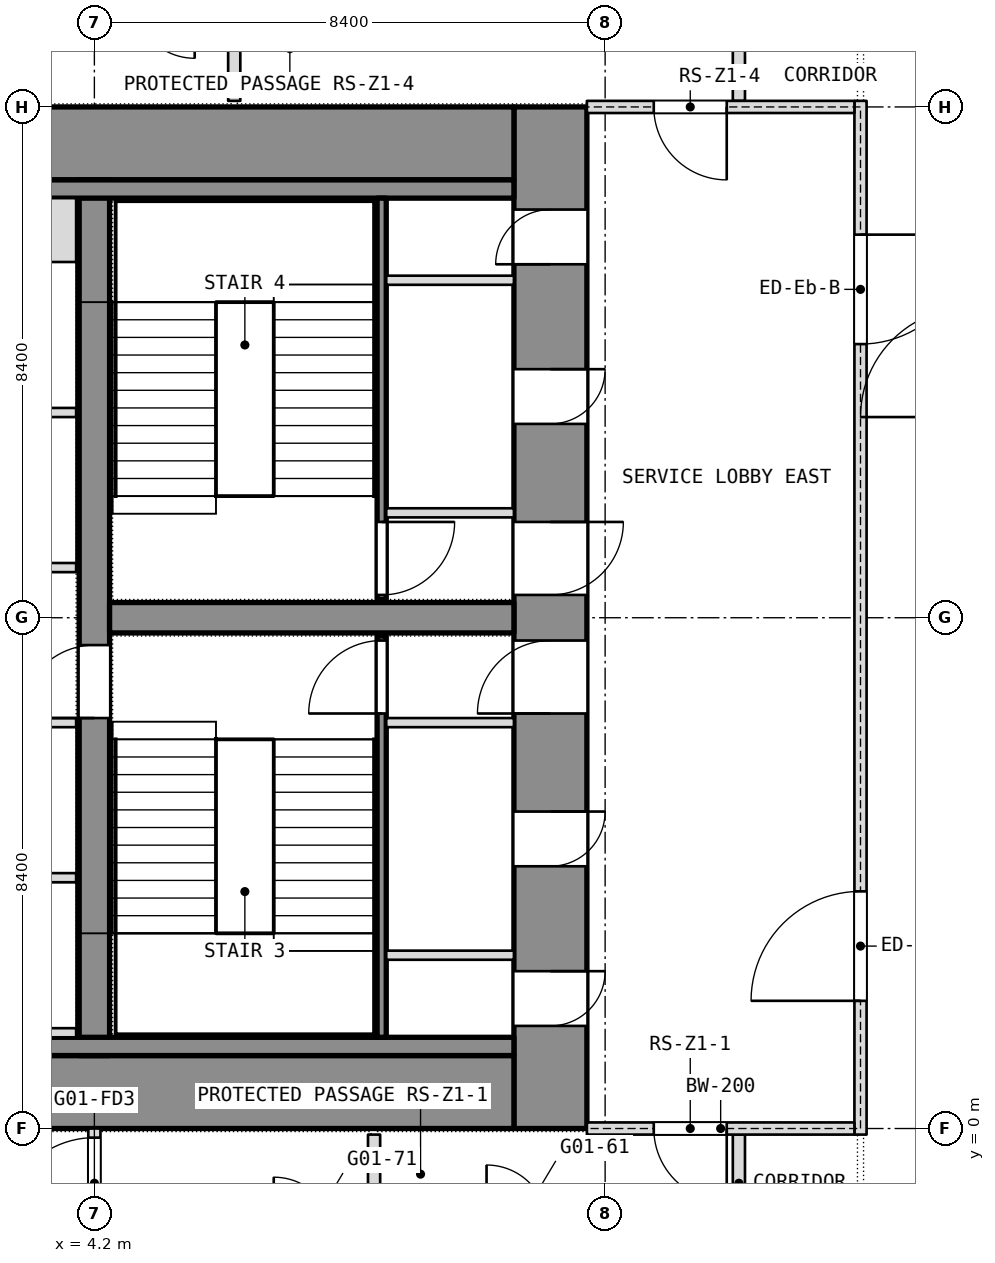
"""IFC4 building model, lengths in metres.
Left out: names, types, materials, properties, quantities, classifications, styles, units other than length and angle.
Written with IfcOpenShell. Run it as: python <this file> out.ifc"""

import sys

from ifc_helpers import new_model, si_unit, direction, frame, frame_2d, origin, place, context, subcontext, project, spatial, rectangle, extrude, element, fill, save


model = new_model("IFC4")
c1 = context("Model", 3, precision=1e-05, world=origin(), true_north=direction((0.0, 1.0)))
c2 = subcontext(c1, "Body", "Model", "MODEL_VIEW")
j1 = project(units=[si_unit("LENGTHUNIT", "METRE"), si_unit("PLANEANGLEUNIT", "RADIAN")], contexts=[c1])
p1 = place(None, origin())
s1 = spatial("IfcSite", under=j1, at=p1, CompositionType="ELEMENT")
p2 = place(p1, origin())
s2 = spatial("IfcBuilding", under=s1, at=p2, CompositionType="ELEMENT")
p3 = place(p2, frame((0.0, 0.0, 36.5)))
s3 = spatial("IfcBuildingStorey", under=s2, at=p3, CompositionType="ELEMENT", Elevation=36.5)
p4 = place(p3, frame((11.7, 0.0, 0.0), z_axis=(0.0, 0.0, 1.0), x_axis=(0.0, 1.0, 0.0)))
e1 = element("IfcWall", 1, at=p4, inside=s3, PredefinedType="SHEAR", context=c2, shape_type="SweptSolid", body=[
    extrude(rectangle(XDim=16.8, YDim=1.2, at=frame_2d((8.4, 0.0))), origin(), (0.0, 0.0, 1.0), 3.6),
])
p5 = place(p4, frame((1.688, 0.0, 0.0)))
e2 = element("IfcOpeningElement", 2, at=p5, cuts=e1, PredefinedType="OPENING", context=c2, shape_type="SweptSolid", body=[
    extrude(rectangle(XDim=0.9, YDim=2.1, at=frame_2d((0.45, 1.05))), frame((0.0, 0.6, 0.0), z_axis=(0.0, -1.0, 0.0), x_axis=(1.0, 0.0, 0.0)), (0.0, 0.0, 1.0), 1.2),
])
p6 = place(p4, frame((4.312, 0.0, 0.0)))
e3 = element("IfcOpeningElement", 3, at=p6, cuts=e1, PredefinedType="OPENING", context=c2, shape_type="SweptSolid", body=[
    extrude(rectangle(XDim=0.9, YDim=2.1, at=frame_2d((0.45, 1.05))), frame((0.0, 0.6, 0.0), z_axis=(0.0, -1.0, 0.0), x_axis=(1.0, 0.0, 0.0)), (0.0, 0.0, 1.0), 1.2),
])
p7 = place(p4, frame((6.825, 0.0, 0.0)))
e4 = element("IfcOpeningElement", 4, at=p7, cuts=e1, PredefinedType="OPENING", context=c2, shape_type="SweptSolid", body=[
    extrude(rectangle(XDim=1.2, YDim=2.1, at=frame_2d((0.6, 1.05))), frame((0.0, 0.6, 0.0), z_axis=(0.0, -1.0, 0.0), x_axis=(1.0, 0.0, 0.0)), (0.0, 0.0, 1.0), 1.2),
])
p8 = place(p4, frame((14.212, 0.0, 0.0)))
e5 = element("IfcOpeningElement", 5, at=p8, cuts=e1, PredefinedType="OPENING", context=c2, shape_type="SweptSolid", body=[
    extrude(rectangle(XDim=0.9, YDim=2.1, at=frame_2d((0.45, 1.05))), frame((0.0, 0.6, 0.0), z_axis=(0.0, -1.0, 0.0), x_axis=(1.0, 0.0, 0.0)), (0.0, 0.0, 1.0), 1.2),
])
p9 = place(p4, frame((11.587, 0.0, 0.0)))
e6 = element("IfcOpeningElement", 6, at=p9, cuts=e1, PredefinedType="OPENING", context=c2, shape_type="SweptSolid", body=[
    extrude(rectangle(XDim=0.9, YDim=2.1, at=frame_2d((0.45, 1.05))), frame((0.0, 0.6, 0.0), z_axis=(0.0, -1.0, 0.0), x_axis=(1.0, 0.0, 0.0)), (0.0, 0.0, 1.0), 1.2),
])
p10 = place(p4, frame((8.775, 0.0, 0.0)))
e7 = element("IfcOpeningElement", 7, at=p10, cuts=e1, PredefinedType="OPENING", context=c2, shape_type="SweptSolid", body=[
    extrude(rectangle(XDim=1.2, YDim=2.1, at=frame_2d((0.6, 1.05))), frame((0.0, 0.6, 0.0), z_axis=(0.0, -1.0, 0.0), x_axis=(1.0, 0.0, 0.0)), (0.0, 0.0, 1.0), 1.2),
])
for number, where, z_axis, x_axis in (
    (8, (-11.1, 0.6, 0.0), (0.0, 0.0, 1.0), (1.0, 0.0, 0.0)),
    (9, (-11.1, 16.2, 0.0), (0.0, 0.0, 1.0), (1.0, 0.0, 0.0)),
):
    element("IfcWall", number, at=place(p3, frame(where, z_axis=z_axis, x_axis=x_axis)), inside=s3, PredefinedType="SHEAR", context=c2, shape_type="SweptSolid", body=[
        extrude(rectangle(XDim=22.2, YDim=1.2, at=frame_2d((11.1, 0.0))), origin(), (0.0, 0.0, 1.0), 3.6),
    ])
p11 = place(p3, frame((4.2, 1.2, 0.0), z_axis=(0.0, 0.0, 1.0), x_axis=(0.0, 1.0, 0.0)))
e10 = element("IfcWall", 10, at=p11, inside=s3, PredefinedType="SHEAR", context=c2, shape_type="SweptSolid", body=[
    extrude(rectangle(XDim=14.4, YDim=0.5, at=frame_2d((7.2, 0.0))), origin(), (0.0, 0.0, 1.0), 3.6),
])
p12 = place(p11, frame((5.55, 0.0, 0.0)))
e11 = element("IfcOpeningElement", 11, at=p12, cuts=e10, PredefinedType="OPENING", context=c2, shape_type="SweptSolid", body=[
    extrude(rectangle(XDim=1.2, YDim=2.1, at=frame_2d((0.6, 1.05))), frame((0.0, 0.25, 0.0), z_axis=(0.0, -1.0, 0.0), x_axis=(1.0, 0.0, 0.0)), (0.0, 0.0, 1.0), 0.5),
])
p13 = place(p3, frame((4.45, 8.4, 0.0), z_axis=(0.0, 0.0, 1.0), x_axis=(1.0, 0.0, 0.0)))
e12 = element("IfcWall", 12, at=p13, inside=s3, PredefinedType="SHEAR", context=c2, shape_type="SweptSolid", body=[
    extrude(rectangle(XDim=6.65, YDim=0.5, at=frame_2d((3.325, 0.0))), origin(), (0.0, 0.0, 1.0), 3.6),
])
p14 = place(p3, frame((14.8, -1.7, 0.0), z_axis=(0.0, 0.0, 1.0), x_axis=(0.0, 1.0, 0.0)))
e13 = element("IfcWall", 13, at=p14, inside=s3, PredefinedType="PARTITIONING", context=c2, shape_type="SweptSolid", body=[
    extrude(rectangle(XDim=1.6, YDim=0.2, at=frame_2d((0.8, 0.0))), origin(), (0.0, 0.0, 1.0), 3.34),
])
p15 = place(p3, frame((14.8, 16.9, 0.0), z_axis=(0.0, 0.0, 1.0), x_axis=(0.0, 1.0, 0.0)))
e14 = element("IfcWall", 14, at=p15, inside=s3, PredefinedType="PARTITIONING", context=c2, shape_type="SweptSolid", body=[
    extrude(rectangle(XDim=1.6, YDim=0.2, at=frame_2d((0.8, 0.0))), origin(), (0.0, 0.0, 1.0), 3.34),
])
p16 = place(p3, frame((8.8, -1.7, 0.0), z_axis=(0.0, 0.0, 1.0), x_axis=(0.0, 1.0, 0.0)))
e15 = element("IfcWall", 15, at=p16, inside=s3, PredefinedType="PARTITIONING", context=c2, shape_type="SweptSolid", body=[
    extrude(rectangle(XDim=1.6, YDim=0.2, at=frame_2d((0.8, 0.0))), origin(), (0.0, 0.0, 1.0), 3.34),
])
p17 = place(p3, frame((6.5, 16.9, 0.0), z_axis=(0.0, 0.0, 1.0), x_axis=(0.0, 1.0, 0.0)))
e16 = element("IfcWall", 16, at=p17, inside=s3, PredefinedType="PARTITIONING", context=c2, shape_type="SweptSolid", body=[
    extrude(rectangle(XDim=1.6, YDim=0.2, at=frame_2d((0.8, 0.0))), origin(), (0.0, 0.0, 1.0), 3.34),
])
p18 = place(p3, frame((4.2, -12.7, 0.0), z_axis=(0.0, 0.0, 1.0), x_axis=(0.0, 1.0, 0.0)))
e17 = element("IfcWall", 17, at=p18, inside=s3, PredefinedType="PARTITIONING", context=c2, shape_type="SweptSolid", body=[
    extrude(rectangle(XDim=12.7, YDim=0.2, at=frame_2d((6.35, 0.0))), origin(), (0.0, 0.0, 1.0), 3.34),
])
p19 = place(p18, frame((11.05, 0.0, 0.0)))
e18 = element("IfcOpeningElement", 18, at=p19, cuts=e17, PredefinedType="OPENING", context=c2, shape_type="SweptSolid", body=[
    extrude(rectangle(XDim=1.5, YDim=2.1, at=frame_2d((0.75, 1.05))), frame((0.0, 0.1, 0.0), z_axis=(0.0, -1.0, 0.0), x_axis=(1.0, 0.0, 0.0)), (0.0, 0.0, 1.0), 0.2),
])
p20 = place(p18, frame((0.225, 0.0, 0.0)))
e19 = element("IfcOpeningElement", 19, at=p20, cuts=e17, PredefinedType="OPENING", context=c2, shape_type="SweptSolid", body=[
    extrude(rectangle(XDim=1.5, YDim=2.1, at=frame_2d((0.75, 1.05))), frame((0.0, 0.1, 0.0), z_axis=(0.0, -1.0, 0.0), x_axis=(1.0, 0.0, 0.0)), (0.0, 0.0, 1.0), 0.2),
])
for number, where, z_axis, x_axis in (
    (20, (-11.1, 1.35, 0.0), (0.0, 0.0, 1.0), (1.0, 0.0, 0.0)),
    (21, (-11.1, 15.45, 0.0), (0.0, 0.0, 1.0), (1.0, 0.0, 0.0)),
):
    element("IfcWall", number, at=place(p3, frame(where, z_axis=z_axis, x_axis=x_axis)), inside=s3, PredefinedType="PARTITIONING", context=c2, shape_type="SweptSolid", body=[
        extrude(rectangle(XDim=22.2, YDim=0.3, at=frame_2d((11.1, 0.0))), origin(), (0.0, 0.0, 1.0), 3.34),
    ])
p21 = place(p3, frame((8.925, 1.5, 0.0), z_axis=(0.0, 0.0, 1.0), x_axis=(0.0, 1.0, 0.0)))
e22 = element("IfcWall", 22, at=p21, inside=s3, PredefinedType="SHEAR", context=c2, shape_type="SweptSolid", body=[
    extrude(rectangle(XDim=6.6, YDim=0.15, at=frame_2d((3.3, 0.0))), origin(), (0.0, 0.0, 1.0), 3.34),
])
p22 = place(p21, frame((5.325, 0.0, 0.0)))
e23 = element("IfcOpeningElement", 23, at=p22, cuts=e22, PredefinedType="OPENING", context=c2, shape_type="SweptSolid", body=[
    extrude(rectangle(XDim=1.2, YDim=2.1, at=frame_2d((0.6, 1.05))), frame((0.0, 0.075, 0.0), z_axis=(0.0, -1.0, 0.0), x_axis=(1.0, 0.0, 0.0)), (0.0, 0.0, 1.0), 0.15),
])
for number, where, z_axis, x_axis in (
    (24, (9.0, 6.675, 0.0), (0.0, 0.0, 1.0), (1.0, 0.0, 0.0)),
    (25, (9.0, 2.85, 0.0), (0.0, 0.0, 1.0), (1.0, 0.0, 0.0)),
):
    element("IfcWall", number, at=place(p3, frame(where, z_axis=z_axis, x_axis=x_axis)), inside=s3, PredefinedType="PARTITIONING", context=c2, shape_type="SweptSolid", body=[
        extrude(rectangle(XDim=2.1, YDim=0.15, at=frame_2d((1.05, 0.0))), origin(), (0.0, 0.0, 1.0), 3.34),
    ])
p23 = place(p3, frame((8.925, 8.7, 0.0), z_axis=(0.0, 0.0, 1.0), x_axis=(0.0, 1.0, 0.0)))
e26 = element("IfcWall", 26, at=p23, inside=s3, PredefinedType="SHEAR", context=c2, shape_type="SweptSolid", body=[
    extrude(rectangle(XDim=6.6, YDim=0.15, at=frame_2d((3.3, 0.0))), origin(), (0.0, 0.0, 1.0), 3.34),
])
p24 = place(p23, frame((0.075, 0.0, 0.0)))
e27 = element("IfcOpeningElement", 27, at=p24, cuts=e26, PredefinedType="OPENING", context=c2, shape_type="SweptSolid", body=[
    extrude(rectangle(XDim=1.2, YDim=2.1, at=frame_2d((0.6, 1.05))), frame((0.0, 0.075, 0.0), z_axis=(0.0, -1.0, 0.0), x_axis=(1.0, 0.0, 0.0)), (0.0, 0.0, 1.0), 0.15),
])
for number, where, z_axis, x_axis in (
    (28, (9.0, 10.125, 0.0), (0.0, 0.0, 1.0), (1.0, 0.0, 0.0)),
    (29, (9.0, 13.95, 0.0), (0.0, 0.0, 1.0), (1.0, 0.0, 0.0)),
):
    element("IfcWall", number, at=place(p3, frame(where, z_axis=z_axis, x_axis=x_axis)), inside=s3, PredefinedType="PARTITIONING", context=c2, shape_type="SweptSolid", body=[
        extrude(rectangle(XDim=2.1, YDim=0.15, at=frame_2d((1.05, 0.0))), origin(), (0.0, 0.0, 1.0), 3.34),
    ])
p25 = place(p3, frame((-3.9, 4.125, 0.0), z_axis=(0.0, 0.0, 1.0), x_axis=(1.0, 0.0, 0.0)))
e30 = element("IfcWall", 30, at=p25, inside=s3, PredefinedType="PARTITIONING", context=c2, shape_type="SweptSolid", body=[
    extrude(rectangle(XDim=7.8, YDim=0.15, at=frame_2d((3.9, 0.0))), origin(), (0.0, 0.0, 1.0), 3.34),
])
p26 = place(p25, frame((3.75, 0.0, 0.0)))
e31 = element("IfcOpeningElement", 31, at=p26, cuts=e30, PredefinedType="OPENING", context=c2, shape_type="SweptSolid", body=[
    extrude(rectangle(XDim=1.2, YDim=2.1, at=frame_2d((0.6, 1.05))), frame((0.0, 0.075, 0.0), z_axis=(0.0, -1.0, 0.0), x_axis=(1.0, 0.0, 0.0)), (0.0, 0.0, 1.0), 0.15),
])
p27 = place(p3, frame((-3.9, 11.775, 0.0), z_axis=(0.0, 0.0, 1.0), x_axis=(1.0, 0.0, 0.0)))
e32 = element("IfcWall", 32, at=p27, inside=s3, PredefinedType="PARTITIONING", context=c2, shape_type="SweptSolid", body=[
    extrude(rectangle(XDim=7.8, YDim=0.15, at=frame_2d((3.9, 0.0))), origin(), (0.0, 0.0, 1.0), 3.34),
])
p28 = place(p27, frame((3.3, 0.0, 0.0)))
e33 = element("IfcOpeningElement", 33, at=p28, cuts=e32, PredefinedType="OPENING", context=c2, shape_type="SweptSolid", body=[
    extrude(rectangle(XDim=1.2, YDim=2.1, at=frame_2d((0.6, 1.05))), frame((0.0, 0.075, 0.0), z_axis=(0.0, -1.0, 0.0), x_axis=(1.0, 0.0, 0.0)), (0.0, 0.0, 1.0), 0.15),
])
p29 = place(p3, frame((1.65, 1.575, 0.0), z_axis=(0.0, 0.0, 1.0), x_axis=(1.0, 0.0, 0.0)))
e34 = element("IfcWall", 34, at=p29, inside=s3, PredefinedType="SHEAR", context=c2, shape_type="SweptSolid", body=[
    extrude(rectangle(XDim=2.25, YDim=0.15, at=frame_2d((1.125, 0.0))), origin(), (0.0, 0.0, 1.0), 3.6),
])
p30 = place(p3, frame((1.65, 14.775, 0.0), z_axis=(0.0, 0.0, 1.0), x_axis=(1.0, 0.0, 0.0)))
e35 = element("IfcWall", 35, at=p30, inside=s3, PredefinedType="SHEAR", context=c2, shape_type="SweptSolid", body=[
    extrude(rectangle(XDim=2.25, YDim=1.05, at=frame_2d((1.125, 0.0))), origin(), (0.0, 0.0, 1.0), 3.6),
])
for number, where, z_axis, x_axis in (
    (36, (1.65, 6.675, 0.0), (0.0, 0.0, 1.0), (1.0, 0.0, 0.0)),
    (37, (1.65, 9.225, 0.0), (0.0, 0.0, 1.0), (1.0, 0.0, 0.0)),
):
    element("IfcWall", number, at=place(p3, frame(where, z_axis=z_axis, x_axis=x_axis)), inside=s3, PredefinedType="SHEAR", context=c2, shape_type="SweptSolid", body=[
        extrude(rectangle(XDim=2.25, YDim=0.15, at=frame_2d((1.125, 0.0))), origin(), (0.0, 0.0, 1.0), 3.6),
    ])
p31 = place(p3, frame((16.8, -0.1, 0.0), z_axis=(0.0, 0.0, 1.0), x_axis=(0.0, 1.0, 0.0)))
e38 = element("IfcWall", 38, at=p31, inside=s3, PredefinedType="PARTITIONING", context=c2, shape_type="SweptSolid", body=[
    extrude(rectangle(XDim=17.0, YDim=0.2, at=frame_2d((8.5, 0.0))), origin(), (0.0, 0.0, 1.0), 3.34),
])
p32 = place(p31, frame((2.2, 0.0, 0.0)))
e39 = element("IfcOpeningElement", 39, at=p32, cuts=e38, PredefinedType="OPENING", context=c2, shape_type="SweptSolid", body=[
    extrude(rectangle(XDim=1.8, YDim=2.1, at=frame_2d((0.9, 1.05))), frame((0.0, 0.1, 0.0), z_axis=(0.0, -1.0, 0.0), x_axis=(1.0, 0.0, 0.0)), (0.0, 0.0, 1.0), 0.2),
])
p33 = place(p31, frame((13.0, 0.0, 0.0)))
e40 = element("IfcOpeningElement", 40, at=p33, cuts=e38, PredefinedType="OPENING", context=c2, shape_type="SweptSolid", body=[
    extrude(rectangle(XDim=1.8, YDim=2.1, at=frame_2d((0.9, 1.05))), frame((0.0, 0.1, 0.0), z_axis=(0.0, -1.0, 0.0), x_axis=(1.0, 0.0, 0.0)), (0.0, 0.0, 1.0), 0.2),
])
p34 = place(p3, frame((12.3, 0.0, 0.0), z_axis=(0.0, 0.0, 1.0), x_axis=(1.0, 0.0, 0.0)))
e41 = element("IfcWall", 41, at=p34, inside=s3, PredefinedType="PARTITIONING", context=c2, shape_type="SweptSolid", body=[
    extrude(rectangle(XDim=4.4, YDim=0.2, at=frame_2d((2.2, 0.0))), origin(), (0.0, 0.0, 1.0), 2.84),
])
p35 = place(p34, frame((1.1, 0.0, 0.0)))
e42 = element("IfcOpeningElement", 42, at=p35, cuts=e41, PredefinedType="OPENING", context=c2, shape_type="SweptSolid", body=[
    extrude(rectangle(XDim=1.2, YDim=2.1, at=frame_2d((0.6, 1.05))), frame((0.0, 0.1, 0.0), z_axis=(0.0, -1.0, 0.0), x_axis=(1.0, 0.0, 0.0)), (0.0, 0.0, 1.0), 0.2),
])
p36 = place(p3, frame((12.3, 16.8, 0.0), z_axis=(0.0, 0.0, 1.0), x_axis=(1.0, 0.0, 0.0)))
e43 = element("IfcWall", 43, at=p36, inside=s3, PredefinedType="PARTITIONING", context=c2, shape_type="SweptSolid", body=[
    extrude(rectangle(XDim=4.4, YDim=0.2, at=frame_2d((2.2, 0.0))), origin(), (0.0, 0.0, 1.0), 2.84),
])
p37 = place(p36, frame((1.1, 0.0, 0.0)))
e44 = element("IfcOpeningElement", 44, at=p37, cuts=e43, PredefinedType="OPENING", context=c2, shape_type="SweptSolid", body=[
    extrude(rectangle(XDim=1.2, YDim=2.1, at=frame_2d((0.6, 1.05))), frame((0.0, 0.1, 0.0), z_axis=(0.0, -1.0, 0.0), x_axis=(1.0, 0.0, 0.0)), (0.0, 0.0, 1.0), 0.2),
])
p38 = place(p5, origin())
e45 = element("IfcDoor", 45, at=p38, inside=s3, OperationType="SINGLE_SWING_LEFT", PredefinedType="DOOR", context=c2, shape_type="SweptSolid", body=[
    extrude(rectangle(XDim=0.9, YDim=2.1, at=frame_2d((0.45, 1.05))), frame((0.0, 0.025, 0.0), z_axis=(0.0, -1.0, 0.0), x_axis=(1.0, 0.0, 0.0)), (0.0, 0.0, 1.0), 0.05),
])
fill(e2, e45)
p39 = place(p6, origin())
e46 = element("IfcDoor", 46, at=p39, inside=s3, OperationType="SINGLE_SWING_LEFT", PredefinedType="DOOR", context=c2, shape_type="SweptSolid", body=[
    extrude(rectangle(XDim=0.9, YDim=2.1, at=frame_2d((0.45, 1.05))), frame((0.0, 0.025, 0.0), z_axis=(0.0, -1.0, 0.0), x_axis=(1.0, 0.0, 0.0)), (0.0, 0.0, 1.0), 0.05),
])
fill(e3, e46)
p40 = place(p7, origin())
e47 = element("IfcDoor", 47, at=p40, inside=s3, OperationType="SINGLE_SWING_LEFT", PredefinedType="DOOR", context=c2, shape_type="SweptSolid", body=[
    extrude(rectangle(XDim=1.2, YDim=2.1, at=frame_2d((0.6, 1.05))), frame((0.0, 0.025, 0.0), z_axis=(0.0, -1.0, 0.0), x_axis=(1.0, 0.0, 0.0)), (0.0, 0.0, 1.0), 0.05),
])
fill(e4, e47)
p41 = place(p22, origin())
e48 = element("IfcDoor", 48, at=p41, inside=s3, OperationType="SINGLE_SWING_LEFT", PredefinedType="DOOR", context=c2, shape_type="SweptSolid", body=[
    extrude(rectangle(XDim=1.2, YDim=2.1, at=frame_2d((0.6, 1.05))), frame((0.0, 0.025, 0.0), z_axis=(0.0, -1.0, 0.0), x_axis=(1.0, 0.0, 0.0)), (0.0, 0.0, 1.0), 0.05),
])
fill(e23, e48)
p42 = place(p8, origin())
e49 = element("IfcDoor", 49, at=p42, inside=s3, OperationType="SINGLE_SWING_LEFT", PredefinedType="DOOR", context=c2, shape_type="SweptSolid", body=[
    extrude(rectangle(XDim=0.9, YDim=2.1, at=frame_2d((0.45, 1.05))), frame((0.0, 0.025, 0.0), z_axis=(0.0, -1.0, 0.0), x_axis=(1.0, 0.0, 0.0)), (0.0, 0.0, 1.0), 0.05),
])
fill(e5, e49)
p43 = place(p9, origin())
e50 = element("IfcDoor", 50, at=p43, inside=s3, OperationType="SINGLE_SWING_LEFT", PredefinedType="DOOR", context=c2, shape_type="SweptSolid", body=[
    extrude(rectangle(XDim=0.9, YDim=2.1, at=frame_2d((0.45, 1.05))), frame((0.0, 0.025, 0.0), z_axis=(0.0, -1.0, 0.0), x_axis=(1.0, 0.0, 0.0)), (0.0, 0.0, 1.0), 0.05),
])
fill(e6, e50)
p44 = place(p10, origin())
e51 = element("IfcDoor", 51, at=p44, inside=s3, OperationType="SINGLE_SWING_LEFT", PredefinedType="DOOR", context=c2, shape_type="SweptSolid", body=[
    extrude(rectangle(XDim=1.2, YDim=2.1, at=frame_2d((0.6, 1.05))), frame((0.0, 0.025, 0.0), z_axis=(0.0, -1.0, 0.0), x_axis=(1.0, 0.0, 0.0)), (0.0, 0.0, 1.0), 0.05),
])
fill(e7, e51)
p45 = place(p24, origin())
e52 = element("IfcDoor", 52, at=p45, inside=s3, OperationType="SINGLE_SWING_LEFT", PredefinedType="DOOR", context=c2, shape_type="SweptSolid", body=[
    extrude(rectangle(XDim=1.2, YDim=2.1, at=frame_2d((0.6, 1.05))), frame((0.0, 0.025, 0.0), z_axis=(0.0, -1.0, 0.0), x_axis=(1.0, 0.0, 0.0)), (0.0, 0.0, 1.0), 0.05),
])
fill(e27, e52)
p46 = place(p12, origin())
e53 = element("IfcDoor", 53, at=p46, inside=s3, OperationType="SINGLE_SWING_LEFT", PredefinedType="DOOR", context=c2, shape_type="SweptSolid", body=[
    extrude(rectangle(XDim=1.2, YDim=2.1, at=frame_2d((0.6, 1.05))), frame((0.0, 0.025, 0.0), z_axis=(0.0, -1.0, 0.0), x_axis=(1.0, 0.0, 0.0)), (0.0, 0.0, 1.0), 0.05),
])
fill(e11, e53)
p47 = place(p32, origin())
e54 = element("IfcDoor", 54, at=p47, inside=s3, OperationType="DOUBLE_DOOR_SINGLE_SWING", PredefinedType="DOOR", context=c2, shape_type="SweptSolid", body=[
    extrude(rectangle(XDim=1.8, YDim=2.1, at=frame_2d((0.9, 1.05))), frame((0.0, 0.025, 0.0), z_axis=(0.0, -1.0, 0.0), x_axis=(1.0, 0.0, 0.0)), (0.0, 0.0, 1.0), 0.05),
])
fill(e39, e54)
p48 = place(p33, origin())
e55 = element("IfcDoor", 55, at=p48, inside=s3, OperationType="DOUBLE_DOOR_SINGLE_SWING", PredefinedType="DOOR", context=c2, shape_type="SweptSolid", body=[
    extrude(rectangle(XDim=1.8, YDim=2.1, at=frame_2d((0.9, 1.05))), frame((0.0, 0.025, 0.0), z_axis=(0.0, -1.0, 0.0), x_axis=(1.0, 0.0, 0.0)), (0.0, 0.0, 1.0), 0.05),
])
fill(e40, e55)
p49 = place(p35, origin())
e56 = element("IfcDoor", 56, at=p49, inside=s3, OperationType="SINGLE_SWING_LEFT", PredefinedType="DOOR", context=c2, shape_type="SweptSolid", body=[
    extrude(rectangle(XDim=1.2, YDim=2.1, at=frame_2d((0.6, 1.05))), frame((0.0, 0.025, 0.0), z_axis=(0.0, -1.0, 0.0), x_axis=(1.0, 0.0, 0.0)), (0.0, 0.0, 1.0), 0.05),
])
fill(e42, e56)
p50 = place(p37, origin())
e57 = element("IfcDoor", 57, at=p50, inside=s3, OperationType="SINGLE_SWING_LEFT", PredefinedType="DOOR", context=c2, shape_type="SweptSolid", body=[
    extrude(rectangle(XDim=1.2, YDim=2.1, at=frame_2d((0.6, 1.05))), frame((0.0, 0.025, 0.0), z_axis=(0.0, -1.0, 0.0), x_axis=(1.0, 0.0, 0.0)), (0.0, 0.0, 1.0), 0.05),
])
fill(e44, e57)
p51 = place(p19, origin())
e58 = element("IfcDoor", 58, at=p51, inside=s3, OperationType="DOUBLE_DOOR_DOUBLE_SWING", PredefinedType="DOOR", context=c2, shape_type="SweptSolid", body=[
    extrude(rectangle(XDim=1.5, YDim=2.1, at=frame_2d((0.75, 1.05))), frame((0.0, 0.025, 0.0), z_axis=(0.0, -1.0, 0.0), x_axis=(1.0, 0.0, 0.0)), (0.0, 0.0, 1.0), 0.05),
])
fill(e18, e58)
save(model, sys.argv[1])
